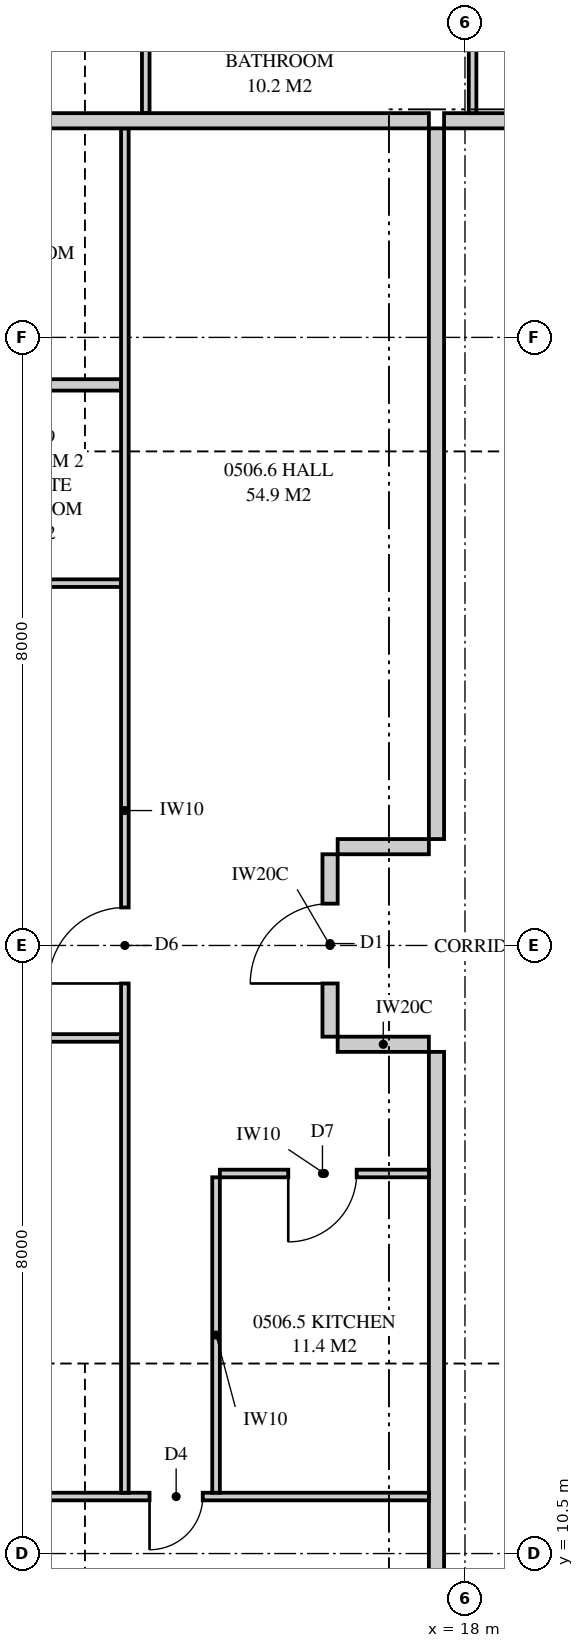
"""IFC4 building model, lengths in metres.
Left out: names, types, materials, properties, quantities, classifications, styles, units other than length and angle.
Written with IfcOpenShell. Run it as: python <this file> out.ifc"""

import sys

from ifc_helpers import new_model, si_unit, direction, frame, frame_2d, origin, place, context, subcontext, project, spatial, polyline, rectangle, outline, extrude, element, fill, save


model = new_model("IFC4")
c1 = context("Model", 3, precision=1e-05, world=origin(), true_north=direction((0.0, 1.0)))
c2 = subcontext(c1, "Body", "Model", "MODEL_VIEW")
j1 = project(units=[si_unit("LENGTHUNIT", "METRE"), si_unit("PLANEANGLEUNIT", "RADIAN")], contexts=[c1])
p1 = place(None, origin())
s1 = spatial("IfcSite", under=j1, at=p1, CompositionType="ELEMENT")
p2 = place(p1, origin())
s2 = spatial("IfcBuilding", under=s1, at=p2, CompositionType="ELEMENT")
p3 = place(p2, frame((0.0, 0.0, 24.35)))
s3 = spatial("IfcBuildingStorey", under=s2, at=p3, CompositionType="ELEMENT", Elevation=24.35)
p4 = place(p3, frame((17.725, 29.35, 0.0), z_axis=(0.0, 0.0, 1.0), x_axis=(1.0, 0.0, 0.0)))
e1 = element("IfcWall", 1, at=p4, inside=s3, PredefinedType="PARTITIONING", context=c2, shape_type="SweptSolid", body=[
    extrude(rectangle(XDim=3.525, YDim=0.2, at=frame_2d((1.762, 0.0))), origin(), (0.0, 0.0, 1.0), 3.11),
])
p5 = place(p3, frame((13.8, 37.825, 0.0), z_axis=(0.0, 0.0, 1.0), x_axis=(0.0, -1.0, 0.0)))
e2 = element("IfcWall", 2, at=p5, inside=s3, PredefinedType="PARTITIONING", context=c2, shape_type="SweptSolid", body=[
    extrude(outline(polyline([(1.635, 2.15), (0.0, 2.15), (0.0, 0.0), (8.375, 0.0), (8.375, 3.11), (1.635, 3.11), (1.635, 2.15)]), holes=[polyline([(1.021, 0.126), (0.529, 0.126), (0.529, 0.919), (1.021, 0.919), (1.021, 0.126)]), polyline([(1.021, 1.231), (0.529, 1.231), (0.529, 2.024), (1.021, 2.024), (1.021, 1.231)])]), frame((0.0, 0.05, 0.0), z_axis=(0.0, -1.0, 0.0), x_axis=(1.0, 0.0, 0.0)), (0.0, 0.0, 1.0), 0.1),
])
p6 = place(p5, frame((4.525, 0.0, 0.0)))
e3 = element("IfcOpeningElement", 3, at=p6, cuts=e2, PredefinedType="OPENING", context=c2, shape_type="SweptSolid", body=[
    extrude(rectangle(XDim=0.9, YDim=2.1, at=frame_2d((0.45, 1.05))), frame((0.0, 0.06, 0.0), z_axis=(0.0, -1.0, 0.0), x_axis=(1.0, 0.0, 0.0)), (0.0, 0.0, 1.0), 0.12),
])
p7 = place(p3, frame((18.1, 37.825, 0.0), z_axis=(0.0, 0.0, 1.0), x_axis=(0.0, -1.0, 0.0)))
e4 = element("IfcWall", 4, at=p7, inside=s3, PredefinedType="PARTITIONING", context=c2, shape_type="SweptSolid", body=[
    extrude(outline(polyline([(0.0, 0.0), (8.375, 0.0), (8.375, 3.11), (1.635, 3.11), (1.635, 2.15), (0.0, 2.15), (0.0, 3.11), (0.0, 0.0)])), frame((0.0, 0.05, 0.0), z_axis=(0.0, -1.0, 0.0), x_axis=(1.0, 0.0, 0.0)), (0.0, 0.0, 1.0), 0.1),
])
p8 = place(p7, frame((4.525, 0.0, 0.0)))
e5 = element("IfcOpeningElement", 5, at=p8, cuts=e4, PredefinedType="OPENING", context=c2, shape_type="SweptSolid", body=[
    extrude(rectangle(XDim=0.9, YDim=2.1, at=frame_2d((0.45, 1.05))), frame((0.0, 0.06, 0.0), z_axis=(0.0, -1.0, 0.0), x_axis=(1.0, 0.0, 0.0)), (0.0, 0.0, 1.0), 0.12),
])
p9 = place(p3, frame((2.0, 29.35, 0.0), z_axis=(0.0, 0.0, 1.0), x_axis=(1.0, 0.0, 0.0)))
e6 = element("IfcWall", 6, at=p9, inside=s3, PredefinedType="PARTITIONING", context=c2, shape_type="SweptSolid", body=[
    extrude(outline(polyline([(0.0, 0.0), (15.525, 0.0), (15.525, 3.11), (11.337, 3.11), (11.337, 2.541), (10.663, 2.541), (10.663, 3.11), (9.51, 3.11), (9.51, 2.51), (6.89, 2.51), (6.89, 3.11), (2.969, 3.11), (2.969, 2.541), (2.577, 2.541), (2.577, 2.15), (0.733, 2.15), (0.733, 3.11), (0.0, 3.11), (0.0, 0.0)])), frame((0.0, 0.1, 0.0), z_axis=(0.0, -1.0, 0.0), x_axis=(1.0, 0.0, 0.0)), (0.0, 0.0, 1.0), 0.2),
])
p10 = place(p3, frame((17.625, 7.75, 0.0), z_axis=(0.0, 0.0, 1.0), x_axis=(0.0, 1.0, 0.0)))
e7 = element("IfcWall", 7, at=p10, inside=s3, PredefinedType="PARTITIONING", context=c2, shape_type="SweptSolid", body=[
    extrude(outline(polyline([(0.0, 0.0), (9.35, 0.0), (9.35, 3.11), (5.587, 3.11), (5.587, 2.541), (4.913, 2.541), (4.913, 3.11), (0.0, 3.11), (0.0, 0.0)])), frame((0.0, 0.1, 0.0), z_axis=(0.0, -1.0, 0.0), x_axis=(1.0, 0.0, 0.0)), (0.0, 0.0, 1.0), 0.2),
])
p11 = place(p3, frame((2.175, 11.25, 0.0), z_axis=(0.0, 0.0, 1.0), x_axis=(1.0, 0.0, 0.0)))
e8 = element("IfcWall", 8, at=p11, inside=s3, PredefinedType="PARTITIONING", context=c2, shape_type="SweptSolid", body=[
    extrude(outline(polyline([(0.188, 3.11), (0.0, 3.11), (0.0, 0.0), (0.529, 0.0), (0.529, 0.263), (1.021, 0.263), (1.021, 0.0), (15.35, 0.0), (15.35, 3.11), (11.112, 3.11), (11.112, 2.541), (10.538, 2.541), (10.538, 3.11), (9.285, 3.11), (9.285, 2.51), (6.765, 2.51), (6.765, 3.11), (2.744, 3.11), (2.744, 2.541), (2.169, 2.541), (2.169, 3.11), (1.93, 3.11), (1.93, 2.15), (1.021, 2.15), (1.021, 1.887), (0.529, 1.887), (0.529, 2.15), (0.188, 2.15), (0.188, 3.11)])), frame((0.0, 0.05, 0.0), z_axis=(0.0, -1.0, 0.0), x_axis=(1.0, 0.0, 0.0)), (0.0, 0.0, 1.0), 0.1),
])
p12 = place(p11, frame((4.85, 0.0, 0.0)))
e9 = element("IfcOpeningElement", 9, at=p12, cuts=e8, PredefinedType="OPENING", context=c2, shape_type="SweptSolid", body=[
    extrude(rectangle(XDim=0.9, YDim=2.1, at=frame_2d((0.45, 1.05))), frame((0.0, 0.06, 0.0), z_axis=(0.0, -1.0, 0.0), x_axis=(1.0, 0.0, 0.0)), (0.0, 0.0, 1.0), 0.12),
])
p13 = place(p11, frame((6.25, 0.0, 0.0)))
e10 = element("IfcOpeningElement", 10, at=p13, cuts=e8, PredefinedType="OPENING", context=c2, shape_type="SweptSolid", body=[
    extrude(rectangle(XDim=0.9, YDim=2.1, at=frame_2d((0.45, 1.05))), frame((0.0, 0.06, 0.0), z_axis=(0.0, -1.0, 0.0), x_axis=(1.0, 0.0, 0.0)), (0.0, 0.0, 1.0), 0.12),
])
p14 = place(p11, frame((11.675, 0.0, 0.0)))
e11 = element("IfcOpeningElement", 11, at=p14, cuts=e8, PredefinedType="OPENING", context=c2, shape_type="SweptSolid", body=[
    extrude(rectangle(XDim=0.7, YDim=2.1, at=frame_2d((0.35, 1.05))), frame((0.0, 0.06, 0.0), z_axis=(0.0, -1.0, 0.0), x_axis=(1.0, 0.0, 0.0)), (0.0, 0.0, 1.0), 0.12),
])
p15 = place(p3, frame((13.525, 11.3, 0.0), z_axis=(0.0, 0.0, 1.0), x_axis=(0.0, 1.0, 0.0)))
e12 = element("IfcWall", 12, at=p15, inside=s3, PredefinedType="PARTITIONING", context=c2, shape_type="SweptSolid", body=[
    extrude(outline(polyline([(0.0, 0.0), (17.95, 0.0), (17.95, 3.11), (13.987, 3.11), (13.987, 2.541), (13.413, 2.541), (13.413, 3.11), (1.987, 3.11), (1.987, 2.541), (1.413, 2.541), (1.413, 3.11), (0.0, 3.11), (0.0, 0.0)])), frame((0.0, 0.05, 0.0), z_axis=(0.0, -1.0, 0.0), x_axis=(1.0, 0.0, 0.0)), (0.0, 0.0, 1.0), 0.1),
])
p16 = place(p15, frame((6.7, 0.0, 0.0)))
e13 = element("IfcOpeningElement", 13, at=p16, cuts=e12, PredefinedType="OPENING", context=c2, shape_type="SweptSolid", body=[
    extrude(rectangle(XDim=1.0, YDim=2.1, at=frame_2d((0.5, 1.05))), frame((0.0, 0.06, 0.0), z_axis=(0.0, -1.0, 0.0), x_axis=(1.0, 0.0, 0.0)), (0.0, 0.0, 1.0), 0.12),
])
p17 = place(p3, frame((14.725, 11.3, 0.0), z_axis=(0.0, 0.0, 1.0), x_axis=(0.0, 1.0, 0.0)))
e14 = element("IfcWall", 14, at=p17, inside=s3, PredefinedType="PARTITIONING", context=c2, shape_type="SweptSolid", body=[
    extrude(outline(polyline([(0.0, 0.0), (4.15, 0.0), (4.15, 3.11), (1.987, 3.11), (1.987, 2.541), (1.413, 2.541), (1.413, 3.11), (0.0, 3.11), (0.0, 0.0)])), frame((0.0, 0.05, 0.0), z_axis=(0.0, -1.0, 0.0), x_axis=(1.0, 0.0, 0.0)), (0.0, 0.0, 1.0), 0.1),
])
p18 = place(p3, frame((14.775, 15.5, 0.0), z_axis=(0.0, 0.0, 1.0), x_axis=(1.0, 0.0, 0.0)))
e15 = element("IfcWall", 15, at=p18, inside=s3, PredefinedType="PARTITIONING", context=c2, shape_type="SweptSolid", body=[
    extrude(rectangle(XDim=2.75, YDim=0.1, at=frame_2d((1.375, 0.0))), origin(), (0.0, 0.0, 1.0), 3.11),
])
p19 = place(p18, frame((0.9, 0.0, 0.0)))
e16 = element("IfcOpeningElement", 16, at=p19, cuts=e15, PredefinedType="OPENING", context=c2, shape_type="SweptSolid", body=[
    extrude(rectangle(XDim=0.9, YDim=2.1, at=frame_2d((0.45, 1.05))), frame((0.0, 0.06, 0.0), z_axis=(0.0, -1.0, 0.0), x_axis=(1.0, 0.0, 0.0)), (0.0, 0.0, 1.0), 0.12),
])
p20 = place(p3, frame((2.175, 17.283, 0.0), z_axis=(0.0, 0.0, 1.0), x_axis=(1.0, 0.0, 0.0)))
e17 = element("IfcWall", 17, at=p20, inside=s3, PredefinedType="PARTITIONING", context=c2, shape_type="SweptSolid", body=[
    extrude(outline(polyline([(0.0, 0.0), (11.3, 0.0), (11.3, 3.11), (9.285, 3.11), (9.285, 2.51), (6.765, 2.51), (6.765, 3.11), (1.635, 3.11), (1.635, 2.15), (0.0, 2.15), (0.0, 3.11), (0.0, 0.0)])), frame((0.0, 0.05, 0.0), z_axis=(0.0, -1.0, 0.0), x_axis=(1.0, 0.0, 0.0)), (0.0, 0.0, 1.0), 0.1),
])
p21 = place(p20, frame((5.15, 0.0, 0.0)))
e18 = element("IfcOpeningElement", 18, at=p21, cuts=e17, PredefinedType="OPENING", context=c2, shape_type="SweptSolid", body=[
    extrude(rectangle(XDim=1.0, YDim=2.1, at=frame_2d((0.5, 1.05))), frame((0.0, 0.06, 0.0), z_axis=(0.0, -1.0, 0.0), x_axis=(1.0, 0.0, 0.0)), (0.0, 0.0, 1.0), 0.12),
])
p22 = place(p3, frame((2.175, 23.267, 0.0), z_axis=(0.0, 0.0, 1.0), x_axis=(1.0, 0.0, 0.0)))
e19 = element("IfcWall", 19, at=p22, inside=s3, PredefinedType="PARTITIONING", context=c2, shape_type="SweptSolid", body=[
    extrude(outline(polyline([(0.529, 2.15), (0.0, 2.15), (0.0, 0.0), (0.529, 0.0), (0.529, 0.274), (1.021, 0.274), (1.021, 0.0), (11.3, 0.0), (11.3, 3.11), (9.285, 3.11), (9.285, 2.51), (6.765, 2.51), (6.765, 3.11), (1.635, 3.11), (1.635, 2.15), (1.021, 2.15), (1.021, 1.876), (0.529, 1.876), (0.529, 2.15)])), frame((0.0, 0.05, 0.0), z_axis=(0.0, -1.0, 0.0), x_axis=(1.0, 0.0, 0.0)), (0.0, 0.0, 1.0), 0.1),
])
p23 = place(p22, frame((5.15, 0.0, 0.0)))
e20 = element("IfcOpeningElement", 20, at=p23, cuts=e19, PredefinedType="OPENING", context=c2, shape_type="SweptSolid", body=[
    extrude(rectangle(XDim=1.0, YDim=2.1, at=frame_2d((0.5, 1.05))), frame((0.0, 0.06, 0.0), z_axis=(0.0, -1.0, 0.0), x_axis=(1.0, 0.0, 0.0)), (0.0, 0.0, 1.0), 0.12),
])
p24 = place(p3, frame((17.625, 19.9, 0.0), z_axis=(0.0, 0.0, 1.0), x_axis=(0.0, 1.0, 0.0)))
e21 = element("IfcWall", 21, at=p24, inside=s3, PredefinedType="PARTITIONING", context=c2, shape_type="SweptSolid", body=[
    extrude(outline(polyline([(0.0, 0.0), (9.35, 0.0), (9.35, 3.11), (5.437, 3.11), (5.437, 2.541), (4.763, 2.541), (4.763, 3.11), (0.0, 3.11), (0.0, 0.0)])), frame((0.0, 0.1, 0.0), z_axis=(0.0, -1.0, 0.0), x_axis=(1.0, 0.0, 0.0)), (0.0, 0.0, 1.0), 0.2),
])
p25 = place(p3, frame((16.225, 17.3, 0.0), z_axis=(0.0, 0.0, 1.0), x_axis=(0.0, 1.0, 0.0)))
e22 = element("IfcWall", 22, at=p25, inside=s3, PredefinedType="PARTITIONING", context=c2, shape_type="SweptSolid", body=[
    extrude(rectangle(XDim=2.4, YDim=0.2, at=frame_2d((1.2, 0.0))), origin(), (0.0, 0.0, 1.0), 3.11),
])
p26 = place(p25, frame((0.7, 0.0, 0.0)))
e23 = element("IfcOpeningElement", 23, at=p26, cuts=e22, PredefinedType="OPENING", context=c2, shape_type="SweptSolid", body=[
    extrude(rectangle(XDim=1.05, YDim=2.2, at=frame_2d((0.525, 1.1))), frame((0.0, 0.11, 0.0), z_axis=(0.0, -1.0, 0.0), x_axis=(1.0, 0.0, 0.0)), (0.0, 0.0, 1.0), 0.22),
])
for number, where, z_axis, x_axis in (
    (24, (17.525, 17.2, 0.0), (0.0, 0.0, 1.0), (-1.0, 0.0, 0.0)),
    (25, (17.525, 19.8, 0.0), (0.0, 0.0, 1.0), (-1.0, 0.0, 0.0)),
):
    element("IfcWall", number, at=place(p3, frame(where, z_axis=z_axis, x_axis=x_axis)), inside=s3, PredefinedType="PARTITIONING", context=c2, shape_type="SweptSolid", body=[
        extrude(rectangle(XDim=1.2, YDim=0.2, at=frame_2d((0.6, 0.0))), origin(), (0.0, 0.0, 1.0), 3.11),
    ])
p27 = place(p3, frame((8.675, 25.875, 0.0), z_axis=(0.0, 0.0, 1.0), x_axis=(1.0, 0.0, 0.0)))
e26 = element("IfcWall", 26, at=p27, inside=s3, PredefinedType="PLUMBINGWALL", context=c2, shape_type="SweptSolid", body=[
    extrude(outline(polyline([(0.0, 0.0), (4.8, 0.0), (4.8, 3.11), (4.637, 3.11), (4.637, 2.541), (4.013, 2.541), (4.013, 3.11), (2.81, 3.11), (2.81, 2.51), (0.24, 2.51), (0.24, 3.11), (0.0, 3.11), (0.0, 0.0)])), frame((0.0, 0.075, 0.0), z_axis=(0.0, -1.0, 0.0), x_axis=(1.0, 0.0, 0.0)), (0.0, 0.0, 1.0), 0.15),
])
p28 = place(p26, origin())
e27 = element("IfcDoor", 27, at=p28, inside=s3, OperationType="SINGLE_SWING_LEFT", PredefinedType="DOOR", context=c2, shape_type="SweptSolid", body=[
    extrude(rectangle(XDim=1.05, YDim=2.2, at=frame_2d((0.525, 1.1))), frame((0.0, 0.025, 0.0), z_axis=(0.0, -1.0, 0.0), x_axis=(1.0, 0.0, 0.0)), (0.0, 0.0, 1.0), 0.05),
])
fill(e23, e27)
p29 = place(p14, frame((0.7, 0.0, 0.0), z_axis=(0.0, 0.0, 1.0), x_axis=(-1.0, 0.0, 0.0)))
e28 = element("IfcDoor", 28, at=p29, inside=s3, OperationType="SINGLE_SWING_RIGHT", PredefinedType="DOOR", context=c2, shape_type="SweptSolid", body=[
    extrude(rectangle(XDim=0.7, YDim=2.1, at=frame_2d((0.35, 1.05))), frame((0.0, 0.025, 0.0), z_axis=(0.0, -1.0, 0.0), x_axis=(1.0, 0.0, 0.0)), (0.0, 0.0, 1.0), 0.05),
])
fill(e11, e28)
p30 = place(p19, frame((0.9, 0.0, 0.0), z_axis=(0.0, 0.0, 1.0), x_axis=(-1.0, 0.0, 0.0)))
e29 = element("IfcDoor", 29, at=p30, inside=s3, OperationType="SINGLE_SWING_RIGHT", PredefinedType="DOOR", context=c2, shape_type="SweptSolid", body=[
    extrude(rectangle(XDim=0.9, YDim=2.1, at=frame_2d((0.45, 1.05))), frame((0.0, 0.025, 0.0), z_axis=(0.0, -1.0, 0.0), x_axis=(1.0, 0.0, 0.0)), (0.0, 0.0, 1.0), 0.05),
])
fill(e16, e29)
p31 = place(p16, origin())
e30 = element("IfcDoor", 30, at=p31, inside=s3, OperationType="SINGLE_SWING_LEFT", PredefinedType="DOOR", context=c2, shape_type="SweptSolid", body=[
    extrude(rectangle(XDim=1.0, YDim=2.1, at=frame_2d((0.5, 1.05))), frame((0.0, 0.025, 0.0), z_axis=(0.0, -1.0, 0.0), x_axis=(1.0, 0.0, 0.0)), (0.0, 0.0, 1.0), 0.05),
])
fill(e13, e30)
save(model, sys.argv[1])
